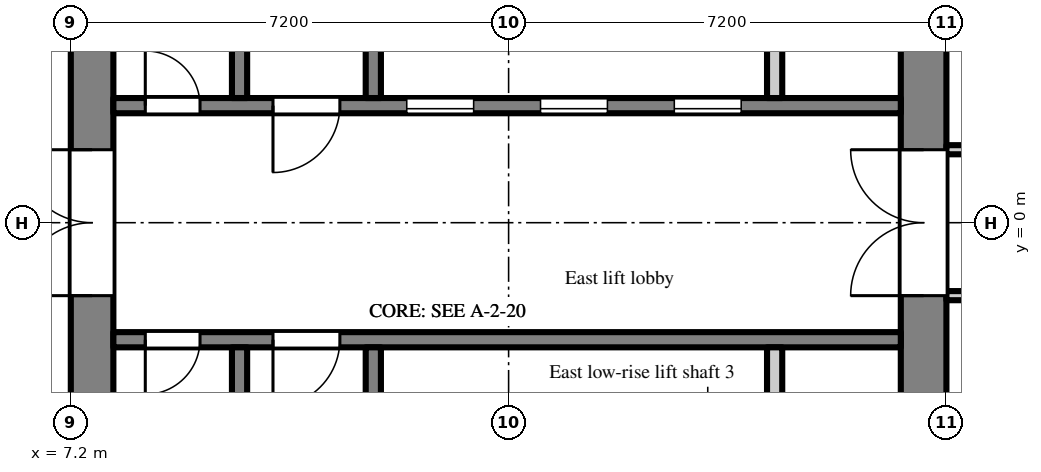
"""IFC4 building model, lengths in metres.
Left out: names, types, materials, properties, quantities, classifications, styles, units other than length and angle.
Written with IfcOpenShell. Run it as: python <this file> out.ifc"""

import sys

from ifc_helpers import new_model, si_unit, direction, frame, frame_2d, origin, place, context, subcontext, project, spatial, rectangle, extrude, element, fill, save


model = new_model("IFC4")
c1 = context("Model", 3, precision=1e-05, world=origin(), true_north=direction((0.0, 1.0)))
c2 = subcontext(c1, "Body", "Model", "MODEL_VIEW")
j1 = project(units=[si_unit("LENGTHUNIT", "METRE"), si_unit("PLANEANGLEUNIT", "RADIAN")], contexts=[c1])
p1 = place(None, origin())
s1 = spatial("IfcSite", under=j1, at=p1, CompositionType="ELEMENT")
p2 = place(p1, origin())
s2 = spatial("IfcBuilding", under=s1, at=p2, CompositionType="ELEMENT")
p3 = place(p2, frame((0.0, 0.0, 120.3)))
s3 = spatial("IfcBuildingStorey", under=s2, at=p3, CompositionType="ELEMENT", Elevation=120.3)
p4 = place(p3, frame((7.55, -7.2, 0.0), z_axis=(0.0, 0.0, 1.0), x_axis=(0.0, 1.0, 0.0)))
e1 = element("IfcWall", 1, at=p4, inside=s3, PredefinedType="SHEAR", context=c2, shape_type="SweptSolid", body=[
    extrude(rectangle(XDim=14.4, YDim=0.7, at=frame_2d((7.2, 0.0))), origin(), (0.0, 0.0, 1.0), 2.6),
])
p5 = place(p4, frame((6.0, 0.0, 0.0)))
e2 = element("IfcOpeningElement", 2, at=p5, cuts=e1, PredefinedType="OPENING", context=c2, shape_type="SweptSolid", body=[
    extrude(rectangle(XDim=2.4, YDim=2.2, at=frame_2d((1.2, 1.1))), frame((0.0, 0.36, 0.0), z_axis=(0.0, -1.0, 0.0), x_axis=(1.0, 0.0, 0.0)), (0.0, 0.0, 1.0), 0.72),
])
p6 = place(p3, frame((21.225, -7.2, 0.0), z_axis=(0.0, 0.0, 1.0), x_axis=(0.0, 1.0, 0.0)))
e3 = element("IfcWall", 3, at=p6, inside=s3, PredefinedType="SHEAR", context=c2, shape_type="SweptSolid", body=[
    extrude(rectangle(XDim=14.4, YDim=0.75, at=frame_2d((7.2, 0.0))), origin(), (0.0, 0.0, 1.0), 2.6),
])
p7 = place(p6, frame((6.0, 0.0, 0.0)))
e4 = element("IfcOpeningElement", 4, at=p7, cuts=e3, PredefinedType="OPENING", context=c2, shape_type="SweptSolid", body=[
    extrude(rectangle(XDim=2.4, YDim=2.2, at=frame_2d((1.2, 1.1))), frame((0.0, 0.385, 0.0), z_axis=(0.0, -1.0, 0.0), x_axis=(1.0, 0.0, 0.0)), (0.0, 0.0, 1.0), 0.77),
])
p8 = place(p3, frame((7.9, 1.925, 0.0), z_axis=(0.0, 0.0, 1.0), x_axis=(1.0, 0.0, 0.0)))
e5 = element("IfcWall", 5, at=p8, inside=s3, PredefinedType="SHEAR", context=c2, shape_type="SweptSolid", body=[
    extrude(rectangle(XDim=12.95, YDim=0.25, at=frame_2d((6.475, 0.0))), origin(), (0.0, 0.0, 1.0), 2.6),
])
p9 = place(p8, frame((4.825, 0.0, 0.0)))
e6 = element("IfcOpeningElement", 6, at=p9, cuts=e5, PredefinedType="OPENING", context=c2, shape_type="SweptSolid", body=[
    extrude(rectangle(XDim=1.1, YDim=2.1, at=frame_2d((0.55, 1.05))), frame((0.0, 0.135, 0.0), z_axis=(0.0, -1.0, 0.0), x_axis=(1.0, 0.0, 0.0)), (0.0, 0.0, 1.0), 0.27),
])
p10 = place(p8, frame((7.025, 0.0, 0.0)))
e7 = element("IfcOpeningElement", 7, at=p10, cuts=e5, PredefinedType="OPENING", context=c2, shape_type="SweptSolid", body=[
    extrude(rectangle(XDim=1.1, YDim=2.1, at=frame_2d((0.55, 1.05))), frame((0.0, 0.135, 0.0), z_axis=(0.0, -1.0, 0.0), x_axis=(1.0, 0.0, 0.0)), (0.0, 0.0, 1.0), 0.27),
])
p11 = place(p8, frame((9.225, 0.0, 0.0)))
e8 = element("IfcOpeningElement", 8, at=p11, cuts=e5, PredefinedType="OPENING", context=c2, shape_type="SweptSolid", body=[
    extrude(rectangle(XDim=1.1, YDim=2.1, at=frame_2d((0.55, 1.05))), frame((0.0, 0.135, 0.0), z_axis=(0.0, -1.0, 0.0), x_axis=(1.0, 0.0, 0.0)), (0.0, 0.0, 1.0), 0.27),
])
p12 = place(p8, frame((0.525, 0.0, 0.0)))
e9 = element("IfcOpeningElement", 9, at=p12, cuts=e5, PredefinedType="OPENING", context=c2, shape_type="SweptSolid", body=[
    extrude(rectangle(XDim=0.9, YDim=2.1, at=frame_2d((0.45, 1.05))), frame((0.0, 0.135, 0.0), z_axis=(0.0, -1.0, 0.0), x_axis=(1.0, 0.0, 0.0)), (0.0, 0.0, 1.0), 0.27),
])
p13 = place(p8, frame((2.625, 0.0, 0.0)))
e10 = element("IfcOpeningElement", 10, at=p13, cuts=e5, PredefinedType="OPENING", context=c2, shape_type="SweptSolid", body=[
    extrude(rectangle(XDim=1.1, YDim=2.1, at=frame_2d((0.55, 1.05))), frame((0.0, 0.135, 0.0), z_axis=(0.0, -1.0, 0.0), x_axis=(1.0, 0.0, 0.0)), (0.0, 0.0, 1.0), 0.27),
])
p14 = place(p3, frame((9.975, 2.05, 0.0), z_axis=(0.0, 0.0, 1.0), x_axis=(0.0, 1.0, 0.0)))
e11 = element("IfcWall", 11, at=p14, inside=s3, PredefinedType="SHEAR", context=c2, shape_type="SweptSolid", body=[
    extrude(rectangle(XDim=4.7, YDim=0.25, at=frame_2d((2.35, 0.0))), origin(), (0.0, 0.0, 1.0), 2.6),
])
p15 = place(p14, frame((2.95, 0.0, 0.0)))
e12 = element("IfcOpeningElement", 12, at=p15, cuts=e11, PredefinedType="OPENING", context=c2, shape_type="SweptSolid", body=[
    extrude(rectangle(XDim=1.1, YDim=2.1, at=frame_2d((0.55, 1.05))), frame((0.0, 0.135, 0.0), z_axis=(0.0, -1.0, 0.0), x_axis=(1.0, 0.0, 0.0)), (0.0, 0.0, 1.0), 0.27),
])
p16 = place(p3, frame((12.175, 2.05, 0.0), z_axis=(0.0, 0.0, 1.0), x_axis=(0.0, 1.0, 0.0)))
e13 = element("IfcWall", 13, at=p16, inside=s3, PredefinedType="SHEAR", context=c2, shape_type="SweptSolid", body=[
    extrude(rectangle(XDim=4.7, YDim=0.25, at=frame_2d((2.35, 0.0))), origin(), (0.0, 0.0, 1.0), 2.6),
])
p17 = place(p16, frame((2.975, 0.0, 0.0)))
e14 = element("IfcOpeningElement", 14, at=p17, cuts=e13, PredefinedType="OPENING", context=c2, shape_type="SweptSolid", body=[
    extrude(rectangle(XDim=1.1, YDim=2.1, at=frame_2d((0.55, 1.05))), frame((0.0, 0.135, 0.0), z_axis=(0.0, -1.0, 0.0), x_axis=(1.0, 0.0, 0.0)), (0.0, 0.0, 1.0), 0.27),
])
p18 = place(p3, frame((18.775, 2.05, 0.0), z_axis=(0.0, 0.0, 1.0), x_axis=(0.0, 1.0, 0.0)))
e15 = element("IfcWall", 15, at=p18, inside=s3, PredefinedType="PARTITIONING", context=c2, shape_type="SweptSolid", body=[
    extrude(rectangle(XDim=2.1, YDim=0.25, at=frame_2d((1.05, 0.0))), origin(), (0.0, 0.0, 1.0), 2.6),
])
p19 = place(p3, frame((7.9, -1.925, 0.0), z_axis=(0.0, 0.0, 1.0), x_axis=(1.0, 0.0, 0.0)))
e16 = element("IfcWall", 16, at=p19, inside=s3, PredefinedType="SHEAR", context=c2, shape_type="SweptSolid", body=[
    extrude(rectangle(XDim=12.95, YDim=0.25, at=frame_2d((6.475, 0.0))), origin(), (0.0, 0.0, 1.0), 2.6),
])
p20 = place(p19, frame((0.525, 0.0, 0.0)))
e17 = element("IfcOpeningElement", 17, at=p20, cuts=e16, PredefinedType="OPENING", context=c2, shape_type="SweptSolid", body=[
    extrude(rectangle(XDim=0.9, YDim=2.1, at=frame_2d((0.45, 1.05))), frame((0.0, 0.135, 0.0), z_axis=(0.0, -1.0, 0.0), x_axis=(1.0, 0.0, 0.0)), (0.0, 0.0, 1.0), 0.27),
])
p21 = place(p19, frame((2.625, 0.0, 0.0)))
e18 = element("IfcOpeningElement", 18, at=p21, cuts=e16, PredefinedType="OPENING", context=c2, shape_type="SweptSolid", body=[
    extrude(rectangle(XDim=1.1, YDim=2.1, at=frame_2d((0.55, 1.05))), frame((0.0, 0.135, 0.0), z_axis=(0.0, -1.0, 0.0), x_axis=(1.0, 0.0, 0.0)), (0.0, 0.0, 1.0), 0.27),
])
p22 = place(p3, frame((9.975, -2.05, 0.0), z_axis=(0.0, 0.0, 1.0), x_axis=(0.0, -1.0, 0.0)))
e19 = element("IfcWall", 19, at=p22, inside=s3, PredefinedType="SHEAR", context=c2, shape_type="SweptSolid", body=[
    extrude(rectangle(XDim=4.7, YDim=0.25, at=frame_2d((2.35, 0.0))), origin(), (0.0, 0.0, 1.0), 2.6),
])
p23 = place(p22, frame((2.95, 0.0, 0.0)))
e20 = element("IfcOpeningElement", 20, at=p23, cuts=e19, PredefinedType="OPENING", context=c2, shape_type="SweptSolid", body=[
    extrude(rectangle(XDim=1.1, YDim=2.1, at=frame_2d((0.55, 1.05))), frame((0.0, 0.135, 0.0), z_axis=(0.0, -1.0, 0.0), x_axis=(1.0, 0.0, 0.0)), (0.0, 0.0, 1.0), 0.27),
])
p24 = place(p3, frame((12.175, -2.05, 0.0), z_axis=(0.0, 0.0, 1.0), x_axis=(0.0, -1.0, 0.0)))
e21 = element("IfcWall", 21, at=p24, inside=s3, PredefinedType="SHEAR", context=c2, shape_type="SweptSolid", body=[
    extrude(rectangle(XDim=4.7, YDim=0.25, at=frame_2d((2.35, 0.0))), origin(), (0.0, 0.0, 1.0), 2.6),
])
p25 = place(p24, frame((2.975, 0.0, 0.0)))
e22 = element("IfcOpeningElement", 22, at=p25, cuts=e21, PredefinedType="OPENING", context=c2, shape_type="SweptSolid", body=[
    extrude(rectangle(XDim=1.1, YDim=2.1, at=frame_2d((0.55, 1.05))), frame((0.0, 0.135, 0.0), z_axis=(0.0, -1.0, 0.0), x_axis=(1.0, 0.0, 0.0)), (0.0, 0.0, 1.0), 0.27),
])
p26 = place(p3, frame((18.775, -2.05, 0.0), z_axis=(0.0, 0.0, 1.0), x_axis=(0.0, -1.0, 0.0)))
e23 = element("IfcWall", 23, at=p26, inside=s3, PredefinedType="PARTITIONING", context=c2, shape_type="SweptSolid", body=[
    extrude(rectangle(XDim=2.1, YDim=0.25, at=frame_2d((1.05, 0.0))), origin(), (0.0, 0.0, 1.0), 2.6),
])
p27 = place(p3, frame((21.6, -1.2, 0.0), z_axis=(0.0, 0.0, 1.0), x_axis=(1.0, 0.0, 0.0)))
e24 = element("IfcWall", 24, at=p27, inside=s3, PredefinedType="PARTITIONING", context=c2, shape_type="SweptSolid", body=[
    extrude(rectangle(XDim=14.9, YDim=0.15, at=frame_2d((7.45, 0.0))), origin(), (0.0, 0.0, 1.0), 2.6),
])
p28 = place(p27, frame((0.45, 0.0, 0.0)))
e25 = element("IfcOpeningElement", 25, at=p28, cuts=e24, PredefinedType="OPENING", context=c2, shape_type="SweptSolid", body=[
    extrude(rectangle(XDim=0.9, YDim=2.1, at=frame_2d((0.45, 1.05))), frame((0.0, 0.085, 0.0), z_axis=(0.0, -1.0, 0.0), x_axis=(1.0, 0.0, 0.0)), (0.0, 0.0, 1.0), 0.17),
])
p29 = place(p27, frame((2.25, 0.0, 0.0)))
e26 = element("IfcOpeningElement", 26, at=p29, cuts=e24, PredefinedType="OPENING", context=c2, shape_type="SweptSolid", body=[
    extrude(rectangle(XDim=0.9, YDim=2.1, at=frame_2d((0.45, 1.05))), frame((0.0, 0.085, 0.0), z_axis=(0.0, -1.0, 0.0), x_axis=(1.0, 0.0, 0.0)), (0.0, 0.0, 1.0), 0.17),
])
p30 = place(p27, frame((5.71, 0.0, 0.0)))
e27 = element("IfcOpeningElement", 27, at=p30, cuts=e24, PredefinedType="OPENING", context=c2, shape_type="SweptSolid", body=[
    extrude(rectangle(XDim=1.0, YDim=2.1, at=frame_2d((0.5, 1.05))), frame((0.0, 0.085, 0.0), z_axis=(0.0, -1.0, 0.0), x_axis=(1.0, 0.0, 0.0)), (0.0, 0.0, 1.0), 0.17),
])
p31 = place(p27, frame((11.95, 0.0, 0.0)))
e28 = element("IfcOpeningElement", 28, at=p31, cuts=e24, PredefinedType="OPENING", context=c2, shape_type="SweptSolid", body=[
    extrude(rectangle(XDim=1.8, YDim=2.1, at=frame_2d((0.9, 1.05))), frame((0.0, 0.085, 0.0), z_axis=(0.0, -1.0, 0.0), x_axis=(1.0, 0.0, 0.0)), (0.0, 0.0, 1.0), 0.17),
])
p32 = place(p3, frame((21.6, 1.2, 0.0), z_axis=(0.0, 0.0, 1.0), x_axis=(1.0, 0.0, 0.0)))
e29 = element("IfcWall", 29, at=p32, inside=s3, PredefinedType="PARTITIONING", context=c2, shape_type="SweptSolid", body=[
    extrude(rectangle(XDim=14.9, YDim=0.15, at=frame_2d((7.45, 0.0))), origin(), (0.0, 0.0, 1.0), 2.6),
])
p33 = place(p32, frame((0.45, 0.0, 0.0)))
e30 = element("IfcOpeningElement", 30, at=p33, cuts=e29, PredefinedType="OPENING", context=c2, shape_type="SweptSolid", body=[
    extrude(rectangle(XDim=0.9, YDim=2.1, at=frame_2d((0.45, 1.05))), frame((0.0, 0.085, 0.0), z_axis=(0.0, -1.0, 0.0), x_axis=(1.0, 0.0, 0.0)), (0.0, 0.0, 1.0), 0.17),
])
p34 = place(p32, frame((2.25, 0.0, 0.0)))
e31 = element("IfcOpeningElement", 31, at=p34, cuts=e29, PredefinedType="OPENING", context=c2, shape_type="SweptSolid", body=[
    extrude(rectangle(XDim=0.9, YDim=2.1, at=frame_2d((0.45, 1.05))), frame((0.0, 0.085, 0.0), z_axis=(0.0, -1.0, 0.0), x_axis=(1.0, 0.0, 0.0)), (0.0, 0.0, 1.0), 0.17),
])
p35 = place(p32, frame((6.3, 0.0, 0.0)))
e32 = element("IfcOpeningElement", 32, at=p35, cuts=e29, PredefinedType="OPENING", context=c2, shape_type="SweptSolid", body=[
    extrude(rectangle(XDim=1.8, YDim=2.1, at=frame_2d((0.9, 1.05))), frame((0.0, 0.085, 0.0), z_axis=(0.0, -1.0, 0.0), x_axis=(1.0, 0.0, 0.0)), (0.0, 0.0, 1.0), 0.17),
])
p36 = place(p32, frame((11.95, 0.0, 0.0)))
e33 = element("IfcOpeningElement", 33, at=p36, cuts=e29, PredefinedType="OPENING", context=c2, shape_type="SweptSolid", body=[
    extrude(rectangle(XDim=1.8, YDim=2.1, at=frame_2d((0.9, 1.05))), frame((0.0, 0.085, 0.0), z_axis=(0.0, -1.0, 0.0), x_axis=(1.0, 0.0, 0.0)), (0.0, 0.0, 1.0), 0.17),
])
p37 = place(p9, origin())
e34 = element("IfcDoor", 34, at=p37, inside=s3, OperationType="SLIDING_TO_LEFT", PredefinedType="DOOR", context=c2, shape_type="SweptSolid", body=[
    extrude(rectangle(XDim=1.1, YDim=2.1, at=frame_2d((0.55, 1.05))), frame((0.0, 0.025, 0.0), z_axis=(0.0, -1.0, 0.0), x_axis=(1.0, 0.0, 0.0)), (0.0, 0.0, 1.0), 0.05),
])
fill(e6, e34)
p38 = place(p10, origin())
e35 = element("IfcDoor", 35, at=p38, inside=s3, OperationType="SLIDING_TO_LEFT", PredefinedType="DOOR", context=c2, shape_type="SweptSolid", body=[
    extrude(rectangle(XDim=1.1, YDim=2.1, at=frame_2d((0.55, 1.05))), frame((0.0, 0.025, 0.0), z_axis=(0.0, -1.0, 0.0), x_axis=(1.0, 0.0, 0.0)), (0.0, 0.0, 1.0), 0.05),
])
fill(e7, e35)
p39 = place(p11, origin())
e36 = element("IfcDoor", 36, at=p39, inside=s3, OperationType="SLIDING_TO_LEFT", PredefinedType="DOOR", context=c2, shape_type="SweptSolid", body=[
    extrude(rectangle(XDim=1.1, YDim=2.1, at=frame_2d((0.55, 1.05))), frame((0.0, 0.025, 0.0), z_axis=(0.0, -1.0, 0.0), x_axis=(1.0, 0.0, 0.0)), (0.0, 0.0, 1.0), 0.05),
])
fill(e8, e36)
p40 = place(p12, origin())
e37 = element("IfcDoor", 37, at=p40, inside=s3, OperationType="SINGLE_SWING_LEFT", PredefinedType="DOOR", context=c2, shape_type="SweptSolid", body=[
    extrude(rectangle(XDim=0.9, YDim=2.1, at=frame_2d((0.45, 1.05))), frame((0.0, 0.025, 0.0), z_axis=(0.0, -1.0, 0.0), x_axis=(1.0, 0.0, 0.0)), (0.0, 0.0, 1.0), 0.05),
])
fill(e9, e37)
p41 = place(p20, frame((0.9, 0.0, 0.0), z_axis=(0.0, 0.0, 1.0), x_axis=(-1.0, 0.0, 0.0)))
e38 = element("IfcDoor", 38, at=p41, inside=s3, OperationType="SINGLE_SWING_RIGHT", PredefinedType="DOOR", context=c2, shape_type="SweptSolid", body=[
    extrude(rectangle(XDim=0.9, YDim=2.1, at=frame_2d((0.45, 1.05))), frame((0.0, 0.025, 0.0), z_axis=(0.0, -1.0, 0.0), x_axis=(1.0, 0.0, 0.0)), (0.0, 0.0, 1.0), 0.05),
])
fill(e17, e38)
p42 = place(p13, frame((1.1, 0.0, 0.0), z_axis=(0.0, 0.0, 1.0), x_axis=(-1.0, 0.0, 0.0)))
e39 = element("IfcDoor", 39, at=p42, inside=s3, OperationType="SINGLE_SWING_RIGHT", PredefinedType="DOOR", context=c2, shape_type="SweptSolid", body=[
    extrude(rectangle(XDim=1.1, YDim=2.1, at=frame_2d((0.55, 1.05))), frame((0.0, 0.025, 0.0), z_axis=(0.0, -1.0, 0.0), x_axis=(1.0, 0.0, 0.0)), (0.0, 0.0, 1.0), 0.05),
])
fill(e10, e39)
p43 = place(p21, frame((1.1, 0.0, 0.0), z_axis=(0.0, 0.0, 1.0), x_axis=(-1.0, 0.0, 0.0)))
e40 = element("IfcDoor", 40, at=p43, inside=s3, OperationType="SINGLE_SWING_RIGHT", PredefinedType="DOOR", context=c2, shape_type="SweptSolid", body=[
    extrude(rectangle(XDim=1.1, YDim=2.1, at=frame_2d((0.55, 1.05))), frame((0.0, 0.025, 0.0), z_axis=(0.0, -1.0, 0.0), x_axis=(1.0, 0.0, 0.0)), (0.0, 0.0, 1.0), 0.05),
])
fill(e18, e40)
p44 = place(p5, origin())
e41 = element("IfcDoor", 41, at=p44, inside=s3, OperationType="DOUBLE_DOOR_DOUBLE_SWING", PredefinedType="DOOR", context=c2, shape_type="SweptSolid", body=[
    extrude(rectangle(XDim=2.4, YDim=2.2, at=frame_2d((1.2, 1.1))), frame((0.0, 0.025, 0.0), z_axis=(0.0, -1.0, 0.0), x_axis=(1.0, 0.0, 0.0)), (0.0, 0.0, 1.0), 0.05),
])
fill(e2, e41)
p45 = place(p7, origin())
e42 = element("IfcDoor", 42, at=p45, inside=s3, OperationType="DOUBLE_DOOR_DOUBLE_SWING", PredefinedType="DOOR", context=c2, shape_type="SweptSolid", body=[
    extrude(rectangle(XDim=2.4, YDim=2.2, at=frame_2d((1.2, 1.1))), frame((0.0, 0.025, 0.0), z_axis=(0.0, -1.0, 0.0), x_axis=(1.0, 0.0, 0.0)), (0.0, 0.0, 1.0), 0.05),
])
fill(e4, e42)
save(model, sys.argv[1])
